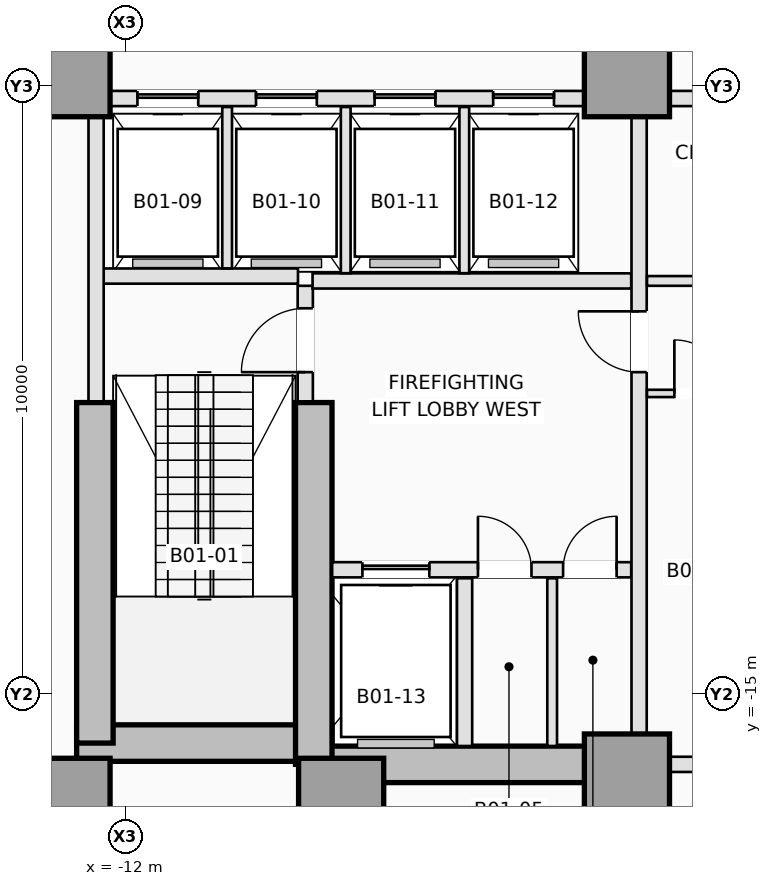
"""IFC4 building model, lengths in metres.
Left out: names, types, materials, properties, quantities, classifications, styles, units other than length and angle.
Written with IfcOpenShell. Run it as: python <this file> out.ifc"""

import sys

from ifc_helpers import new_model, si_unit, direction, frame, frame_2d, origin, origin_2d, place, context, subcontext, project, spatial, rectangle, extrude, element, fill, save


model = new_model("IFC4")
c1 = context("Model", 3, precision=1e-05, world=origin(), true_north=direction((0.0, 1.0)))
c2 = subcontext(c1, "Body", "Model", "MODEL_VIEW")
j1 = project(units=[si_unit("LENGTHUNIT", "METRE"), si_unit("PLANEANGLEUNIT", "RADIAN")], contexts=[c1])
p1 = place(None, origin())
s1 = spatial("IfcSite", under=j1, at=p1, CompositionType="ELEMENT")
p2 = place(p1, origin())
s2 = spatial("IfcBuilding", under=s1, at=p2, CompositionType="ELEMENT")
p3 = place(p2, frame((0.0, 0.0, -5.0)))
s3 = spatial("IfcBuildingStorey", under=s2, at=p3, CompositionType="ELEMENT", Elevation=-5.0)
p4 = place(p3, frame((-12.8, -15.8, 0.0), z_axis=(0.0, 0.0, 1.0), x_axis=(1.0, 0.0, 0.0)))
e1 = element("IfcWall", 1, at=p4, inside=s3, PredefinedType="SHEAR", context=c2, shape_type="SweptSolid", body=[
    extrude(rectangle(XDim=4.2, YDim=0.6, at=frame_2d((2.1, 0.0))), origin(), (0.0, 0.0, 1.0), 5.0),
])
p5 = place(p3, frame((-8.9, -16.15, 0.0), z_axis=(0.0, 0.0, 1.0), x_axis=(1.0, 0.0, 0.0)))
e2 = element("IfcWall", 2, at=p5, inside=s3, PredefinedType="SHEAR", context=c2, shape_type="SweptSolid", body=[
    extrude(rectangle(XDim=5.15, YDim=0.6, at=frame_2d((2.575, 0.0))), origin(), (0.0, 0.0, 1.0), 5.0),
])
p6 = place(p3, frame((-12.5, -15.8, 0.0), z_axis=(0.0, 0.0, 1.0), x_axis=(0.0, 1.0, 0.0)))
e3 = element("IfcWall", 3, at=p6, inside=s3, PredefinedType="SHEAR", context=c2, shape_type="SweptSolid", body=[
    extrude(rectangle(XDim=5.6, YDim=0.6, at=frame_2d((2.8, 0.0))), origin(), (0.0, 0.0, 1.0), 5.0),
])
p7 = place(p3, frame((-8.9, -16.15, 0.0), z_axis=(0.0, 0.0, 1.0), x_axis=(0.0, 1.0, 0.0)))
e4 = element("IfcWall", 4, at=p7, inside=s3, PredefinedType="SHEAR", context=c2, shape_type="SweptSolid", body=[
    extrude(rectangle(XDim=5.95, YDim=0.6, at=frame_2d((2.975, 0.0))), origin(), (0.0, 0.0, 1.0), 5.0),
])
for number, where, z_axis, x_axis in (
    (5, (-12.95, -16.75, 0.0), (0.0, 0.0, 1.0), (1.0, 0.0, 0.0)),
    (6, (-8.45, -16.75, 0.0), (0.0, 0.0, 1.0), (1.0, 0.0, 0.0)),
    (7, (-3.75, -16.35, 0.0), (0.0, 0.0, 1.0), (1.0, 0.0, 0.0)),
    (8, (-12.95, -4.8, 0.0), (0.0, 0.0, 1.0), (1.0, 0.0, 0.0)),
    (9, (-3.75, -4.8, 0.0), (0.0, 0.0, 1.0), (1.0, 0.0, 0.0)),
):
    element("IfcColumn", number, at=place(p3, frame(where, z_axis=z_axis, x_axis=x_axis)), inside=s3, PredefinedType="COLUMN", context=c2, shape_type="SweptSolid", body=[
        extrude(rectangle(XDim=1.4, YDim=1.4, at=origin_2d()), origin(), (0.0, 0.0, 1.0), 5.0),
    ])
p8 = place(p3, frame((-9.04, -10.18, 0.0), z_axis=(0.0, 0.0, 1.0), x_axis=(0.0, 1.0, 0.0)))
e10 = element("IfcWall", 10, at=p8, inside=s3, PredefinedType="PARTITIONING", context=c2, shape_type="SweptSolid", body=[
    extrude(rectangle(XDim=1.9, YDim=0.25, at=frame_2d((0.95, 0.0))), origin(), (0.0, 0.0, 1.0), 4.7),
])
p9 = place(p8, frame((0.48, 0.0, 0.0)))
e11 = element("IfcOpeningElement", 11, at=p9, cuts=e10, PredefinedType="OPENING", context=c2, shape_type="SweptSolid", body=[
    extrude(rectangle(XDim=1.05, YDim=2.15, at=frame_2d((0.525, 1.075))), frame((0.0, 0.135, 0.0), z_axis=(0.0, -1.0, 0.0), x_axis=(1.0, 0.0, 0.0)), (0.0, 0.0, 1.0), 0.27),
])
p10 = place(p3, frame((-12.38, -8.12, 0.0), z_axis=(0.0, 0.0, 1.0), x_axis=(1.0, 0.0, 0.0)))
e12 = element("IfcWall", 12, at=p10, inside=s3, PredefinedType="PARTITIONING", context=c2, shape_type="SweptSolid", body=[
    extrude(rectangle(XDim=3.22, YDim=0.25, at=frame_2d((1.61, 0.0))), origin(), (0.0, 0.0, 1.0), 4.7),
])
p11 = place(p3, frame((-12.48, -10.18, 0.0), z_axis=(0.0, 0.0, 1.0), x_axis=(0.0, 1.0, 0.0)))
e13 = element("IfcWall", 13, at=p11, inside=s3, PredefinedType="PARTITIONING", context=c2, shape_type="SweptSolid", body=[
    extrude(rectangle(XDim=4.678, YDim=0.25, at=frame_2d((2.339, 0.0))), origin(), (0.0, 0.0, 1.0), 4.7),
])
p12 = place(p3, frame((-8.598, -12.95, 0.0), z_axis=(0.0, 0.0, 1.0), x_axis=(1.0, 0.0, 0.0)))
e14 = element("IfcWall", 14, at=p12, inside=s3, PredefinedType="PARTITIONING", context=c2, shape_type="SweptSolid", body=[
    extrude(rectangle(XDim=4.918, YDim=0.25, at=frame_2d((2.459, 0.0))), origin(), (0.0, 0.0, 1.0), 4.7),
])
p13 = place(p12, frame((0.498, 0.0, 0.0)))
e15 = element("IfcOpeningElement", 15, at=p13, cuts=e14, PredefinedType="OPENING", context=c2, shape_type="SweptSolid", body=[
    extrude(rectangle(XDim=1.1, YDim=2.15, at=frame_2d((0.55, 1.075))), frame((0.0, 0.135, 0.0), z_axis=(0.0, -1.0, 0.0), x_axis=(1.0, 0.0, 0.0)), (0.0, 0.0, 1.0), 0.27),
])
p14 = place(p12, frame((2.398, 0.0, 0.0)))
e16 = element("IfcOpeningElement", 16, at=p14, cuts=e14, PredefinedType="OPENING", context=c2, shape_type="SweptSolid", body=[
    extrude(rectangle(XDim=0.88, YDim=2.1, at=frame_2d((0.44, 1.05))), frame((0.0, 0.135, 0.0), z_axis=(0.0, -1.0, 0.0), x_axis=(1.0, 0.0, 0.0)), (0.0, 0.0, 1.0), 0.27),
])
p15 = place(p12, frame((3.798, 0.0, 0.0)))
e17 = element("IfcOpeningElement", 17, at=p15, cuts=e14, PredefinedType="OPENING", context=c2, shape_type="SweptSolid", body=[
    extrude(rectangle(XDim=0.88, YDim=2.1, at=frame_2d((0.44, 1.05))), frame((0.0, 0.135, 0.0), z_axis=(0.0, -1.0, 0.0), x_axis=(1.0, 0.0, 0.0)), (0.0, 0.0, 1.0), 0.27),
])
p16 = place(p3, frame((-6.42, -15.848, 0.0), z_axis=(0.0, 0.0, 1.0), x_axis=(0.0, 1.0, 0.0)))
e18 = element("IfcWall", 18, at=p16, inside=s3, PredefinedType="PARTITIONING", context=c2, shape_type="SweptSolid", body=[
    extrude(rectangle(XDim=2.758, YDim=0.25, at=frame_2d((1.379, 0.0))), origin(), (0.0, 0.0, 1.0), 4.7),
])
p17 = place(p3, frame((-4.98, -15.848, 0.0), z_axis=(0.0, 0.0, 1.0), x_axis=(0.0, 1.0, 0.0)))
e19 = element("IfcWall", 19, at=p17, inside=s3, PredefinedType="PARTITIONING", context=c2, shape_type="SweptSolid", body=[
    extrude(rectangle(XDim=2.758, YDim=0.16, at=frame_2d((1.379, 0.0))), origin(), (0.0, 0.0, 1.0), 4.7),
])
p18 = place(p3, frame((-8.92, -8.2, 0.0), z_axis=(0.0, 0.0, 1.0), x_axis=(1.0, 0.0, 0.0)))
e20 = element("IfcWall", 20, at=p18, inside=s3, PredefinedType="PARTITIONING", context=c2, shape_type="SweptSolid", body=[
    extrude(rectangle(XDim=5.24, YDim=0.25, at=frame_2d((2.62, 0.0))), origin(), (0.0, 0.0, 1.0), 4.7),
])
p19 = place(p3, frame((-3.55, -15.648, 0.0), z_axis=(0.0, 0.0, 1.0), x_axis=(0.0, 1.0, 0.0)))
e21 = element("IfcWall", 21, at=p19, inside=s3, PredefinedType="PARTITIONING", context=c2, shape_type="SweptSolid", body=[
    extrude(rectangle(XDim=10.146, YDim=0.25, at=frame_2d((5.073, 0.0))), origin(), (0.0, 0.0, 1.0), 4.7),
])
p20 = place(p19, frame((5.948, 0.0, 0.0)))
e22 = element("IfcOpeningElement", 22, at=p20, cuts=e21, PredefinedType="OPENING", context=c2, shape_type="SweptSolid", body=[
    extrude(rectangle(XDim=1.0, YDim=2.15, at=frame_2d((0.5, 1.075))), frame((0.0, 0.135, 0.0), z_axis=(0.0, -1.0, 0.0), x_axis=(1.0, 0.0, 0.0)), (0.0, 0.0, 1.0), 0.27),
])
p21 = place(p3, frame((-12.248, -5.2, 0.0), z_axis=(0.0, 0.0, 1.0), x_axis=(1.0, 0.0, 0.0)))
e23 = element("IfcWall", 23, at=p21, inside=s3, PredefinedType="PARTITIONING", context=c2, shape_type="SweptSolid", body=[
    extrude(rectangle(XDim=7.796, YDim=0.25, at=frame_2d((3.898, 0.0))), origin(), (0.0, 0.0, 1.0), 4.7),
])
p22 = place(p21, frame((0.448, 0.0, 0.0)))
e24 = element("IfcOpeningElement", 24, at=p22, cuts=e23, PredefinedType="OPENING", context=c2, shape_type="SweptSolid", body=[
    extrude(rectangle(XDim=1.0, YDim=2.15, at=frame_2d((0.5, 1.075))), frame((0.0, 0.135, 0.0), z_axis=(0.0, -1.0, 0.0), x_axis=(1.0, 0.0, 0.0)), (0.0, 0.0, 1.0), 0.27),
])
p23 = place(p21, frame((2.398, 0.0, 0.0)))
e25 = element("IfcOpeningElement", 25, at=p23, cuts=e23, PredefinedType="OPENING", context=c2, shape_type="SweptSolid", body=[
    extrude(rectangle(XDim=1.0, YDim=2.15, at=frame_2d((0.5, 1.075))), frame((0.0, 0.135, 0.0), z_axis=(0.0, -1.0, 0.0), x_axis=(1.0, 0.0, 0.0)), (0.0, 0.0, 1.0), 0.27),
])
p24 = place(p21, frame((4.348, 0.0, 0.0)))
e26 = element("IfcOpeningElement", 26, at=p24, cuts=e23, PredefinedType="OPENING", context=c2, shape_type="SweptSolid", body=[
    extrude(rectangle(XDim=1.0, YDim=2.15, at=frame_2d((0.5, 1.075))), frame((0.0, 0.135, 0.0), z_axis=(0.0, -1.0, 0.0), x_axis=(1.0, 0.0, 0.0)), (0.0, 0.0, 1.0), 0.27),
])
p25 = place(p21, frame((6.298, 0.0, 0.0)))
e27 = element("IfcOpeningElement", 27, at=p25, cuts=e23, PredefinedType="OPENING", context=c2, shape_type="SweptSolid", body=[
    extrude(rectangle(XDim=1.0, YDim=2.15, at=frame_2d((0.5, 1.075))), frame((0.0, 0.135, 0.0), z_axis=(0.0, -1.0, 0.0), x_axis=(1.0, 0.0, 0.0)), (0.0, 0.0, 1.0), 0.27),
])
p26 = place(p3, frame((-3.048, -5.2, 0.0), z_axis=(0.0, 0.0, 1.0), x_axis=(1.0, 0.0, 0.0)))
e28 = element("IfcWall", 28, at=p26, inside=s3, PredefinedType="PARTITIONING", context=c2, shape_type="SweptSolid", body=[
    extrude(rectangle(XDim=2.098, YDim=0.25, at=frame_2d((1.049, 0.0))), origin(), (0.0, 0.0, 1.0), 4.7),
])
p27 = place(p3, frame((-10.325, -7.993, 0.0), z_axis=(0.0, 0.0, 1.0), x_axis=(0.0, 1.0, 0.0)))
e29 = element("IfcWall", 29, at=p27, inside=s3, PredefinedType="PARTITIONING", context=c2, shape_type="SweptSolid", body=[
    extrude(rectangle(XDim=2.653, YDim=0.16, at=frame_2d((1.326, 0.0))), origin(), (0.0, 0.0, 1.0), 4.7),
])
for number, where, z_axis, x_axis in (
    (30, (-8.375, -8.073, 0.0), (0.0, 0.0, 1.0), (0.0, 1.0, 0.0)),
    (31, (-6.425, -8.073, 0.0), (0.0, 0.0, 1.0), (0.0, 1.0, 0.0)),
):
    element("IfcWall", number, at=place(p3, frame(where, z_axis=z_axis, x_axis=x_axis)), inside=s3, PredefinedType="PARTITIONING", context=c2, shape_type="SweptSolid", body=[
        extrude(rectangle(XDim=2.733, YDim=0.16, at=frame_2d((1.366, 0.0))), origin(), (0.0, 0.0, 1.0), 4.7),
    ])
p28 = place(p3, frame((-3.048, -16.15, 0.0), z_axis=(0.0, 0.0, 1.0), x_axis=(1.0, 0.0, 0.0)))
e32 = element("IfcWall", 32, at=p28, inside=s3, PredefinedType="PARTITIONING", context=c2, shape_type="SweptSolid", body=[
    extrude(rectangle(XDim=6.096, YDim=0.25, at=frame_2d((3.048, 0.0))), origin(), (0.0, 0.0, 1.0), 3.676),
])
p29 = place(p3, frame((-3.42, -8.2, 0.0), z_axis=(0.0, 0.0, 1.0), x_axis=(1.0, 0.0, 0.0)))
e33 = element("IfcWall", 33, at=p29, inside=s3, PredefinedType="PARTITIONING", context=c2, shape_type="SweptSolid", body=[
    extrude(rectangle(XDim=6.84, YDim=0.16, at=frame_2d((3.42, 0.0))), origin(), (0.0, 0.0, 1.0), 4.7),
])
p30 = place(p29, frame((2.92, 0.0, 0.0)))
e34 = element("IfcOpeningElement", 34, at=p30, cuts=e33, PredefinedType="OPENING", context=c2, shape_type="SweptSolid", body=[
    extrude(rectangle(XDim=1.0, YDim=2.15, at=frame_2d((0.5, 1.075))), frame((0.0, 0.09, 0.0), z_axis=(0.0, -1.0, 0.0), x_axis=(1.0, 0.0, 0.0)), (0.0, 0.0, 1.0), 0.18),
])
p31 = place(p3, frame((-3.42, -10.05, 0.0), z_axis=(0.0, 0.0, 1.0), x_axis=(1.0, 0.0, 0.0)))
e35 = element("IfcWall", 35, at=p31, inside=s3, PredefinedType="PARTITIONING", context=c2, shape_type="SweptSolid", body=[
    extrude(rectangle(XDim=6.84, YDim=0.12, at=frame_2d((3.42, 0.0))), origin(), (0.0, 0.0, 1.0), 4.7),
])
p32 = place(p31, frame((0.45, 0.0, 0.0)))
e36 = element("IfcOpeningElement", 36, at=p32, cuts=e35, PredefinedType="OPENING", context=c2, shape_type="SweptSolid", body=[
    extrude(rectangle(XDim=0.88, YDim=2.12, at=frame_2d((0.44, 1.06))), frame((0.0, 0.07, 0.0), z_axis=(0.0, -1.0, 0.0), x_axis=(1.0, 0.0, 0.0)), (0.0, 0.0, 1.0), 0.14),
])
p33 = place(p31, frame((3.6, 0.0, 0.0)))
e37 = element("IfcOpeningElement", 37, at=p33, cuts=e35, PredefinedType="OPENING", context=c2, shape_type="SweptSolid", body=[
    extrude(rectangle(XDim=0.92, YDim=2.12, at=frame_2d((0.46, 1.06))), frame((0.0, 0.07, 0.0), z_axis=(0.0, -1.0, 0.0), x_axis=(1.0, 0.0, 0.0)), (0.0, 0.0, 1.0), 0.14),
])
p34 = place(p22, origin())
e38 = element("IfcDoor", 38, at=p34, inside=s3, OperationType="SLIDING_TO_LEFT", PredefinedType="DOOR", context=c2, shape_type="SweptSolid", body=[
    extrude(rectangle(XDim=1.0, YDim=2.15, at=frame_2d((0.5, 1.075))), frame((0.0, 0.025, 0.0), z_axis=(0.0, -1.0, 0.0), x_axis=(1.0, 0.0, 0.0)), (0.0, 0.0, 1.0), 0.05),
])
fill(e24, e38)
p35 = place(p23, origin())
e39 = element("IfcDoor", 39, at=p35, inside=s3, OperationType="SLIDING_TO_LEFT", PredefinedType="DOOR", context=c2, shape_type="SweptSolid", body=[
    extrude(rectangle(XDim=1.0, YDim=2.15, at=frame_2d((0.5, 1.075))), frame((0.0, 0.025, 0.0), z_axis=(0.0, -1.0, 0.0), x_axis=(1.0, 0.0, 0.0)), (0.0, 0.0, 1.0), 0.05),
])
fill(e25, e39)
p36 = place(p24, origin())
e40 = element("IfcDoor", 40, at=p36, inside=s3, OperationType="SLIDING_TO_LEFT", PredefinedType="DOOR", context=c2, shape_type="SweptSolid", body=[
    extrude(rectangle(XDim=1.0, YDim=2.15, at=frame_2d((0.5, 1.075))), frame((0.0, 0.025, 0.0), z_axis=(0.0, -1.0, 0.0), x_axis=(1.0, 0.0, 0.0)), (0.0, 0.0, 1.0), 0.05),
])
fill(e26, e40)
p37 = place(p25, origin())
e41 = element("IfcDoor", 41, at=p37, inside=s3, OperationType="SLIDING_TO_LEFT", PredefinedType="DOOR", context=c2, shape_type="SweptSolid", body=[
    extrude(rectangle(XDim=1.0, YDim=2.15, at=frame_2d((0.5, 1.075))), frame((0.0, 0.025, 0.0), z_axis=(0.0, -1.0, 0.0), x_axis=(1.0, 0.0, 0.0)), (0.0, 0.0, 1.0), 0.05),
])
fill(e27, e41)
p38 = place(p13, origin())
e42 = element("IfcDoor", 42, at=p38, inside=s3, OperationType="SLIDING_TO_LEFT", PredefinedType="DOOR", context=c2, shape_type="SweptSolid", body=[
    extrude(rectangle(XDim=1.1, YDim=2.15, at=frame_2d((0.55, 1.075))), frame((0.0, 0.025, 0.0), z_axis=(0.0, -1.0, 0.0), x_axis=(1.0, 0.0, 0.0)), (0.0, 0.0, 1.0), 0.05),
])
fill(e15, e42)
p39 = place(p9, origin())
e43 = element("IfcDoor", 43, at=p39, inside=s3, OperationType="SINGLE_SWING_LEFT", PredefinedType="DOOR", context=c2, shape_type="SweptSolid", body=[
    extrude(rectangle(XDim=1.05, YDim=2.15, at=frame_2d((0.525, 1.075))), frame((0.0, 0.025, 0.0), z_axis=(0.0, -1.0, 0.0), x_axis=(1.0, 0.0, 0.0)), (0.0, 0.0, 1.0), 0.05),
])
fill(e11, e43)
p40 = place(p14, origin())
e44 = element("IfcDoor", 44, at=p40, inside=s3, OperationType="SINGLE_SWING_LEFT", PredefinedType="TRAPDOOR", context=c2, shape_type="SweptSolid", body=[
    extrude(rectangle(XDim=0.88, YDim=2.1, at=frame_2d((0.44, 1.05))), frame((0.0, 0.025, 0.0), z_axis=(0.0, -1.0, 0.0), x_axis=(1.0, 0.0, 0.0)), (0.0, 0.0, 1.0), 0.05),
])
fill(e16, e44)
p41 = place(p15, origin())
e45 = element("IfcDoor", 45, at=p41, inside=s3, OperationType="SINGLE_SWING_RIGHT", PredefinedType="TRAPDOOR", context=c2, shape_type="SweptSolid", body=[
    extrude(rectangle(XDim=0.88, YDim=2.1, at=frame_2d((0.44, 1.05))), frame((0.0, 0.025, 0.0), z_axis=(0.0, -1.0, 0.0), x_axis=(1.0, 0.0, 0.0)), (0.0, 0.0, 1.0), 0.05),
])
fill(e17, e45)
p42 = place(p20, origin())
e46 = element("IfcDoor", 46, at=p42, inside=s3, OperationType="SINGLE_SWING_RIGHT", PredefinedType="DOOR", context=c2, shape_type="SweptSolid", body=[
    extrude(rectangle(XDim=1.0, YDim=2.15, at=frame_2d((0.5, 1.075))), frame((0.0, 0.025, 0.0), z_axis=(0.0, -1.0, 0.0), x_axis=(1.0, 0.0, 0.0)), (0.0, 0.0, 1.0), 0.05),
])
fill(e22, e46)
p43 = place(p32, origin())
e47 = element("IfcDoor", 47, at=p43, inside=s3, OperationType="SINGLE_SWING_LEFT", PredefinedType="DOOR", context=c2, shape_type="SweptSolid", body=[
    extrude(rectangle(XDim=0.88, YDim=2.12, at=frame_2d((0.44, 1.06))), frame((0.0, 0.025, 0.0), z_axis=(0.0, -1.0, 0.0), x_axis=(1.0, 0.0, 0.0)), (0.0, 0.0, 1.0), 0.05),
])
fill(e36, e47)
save(model, sys.argv[1])
